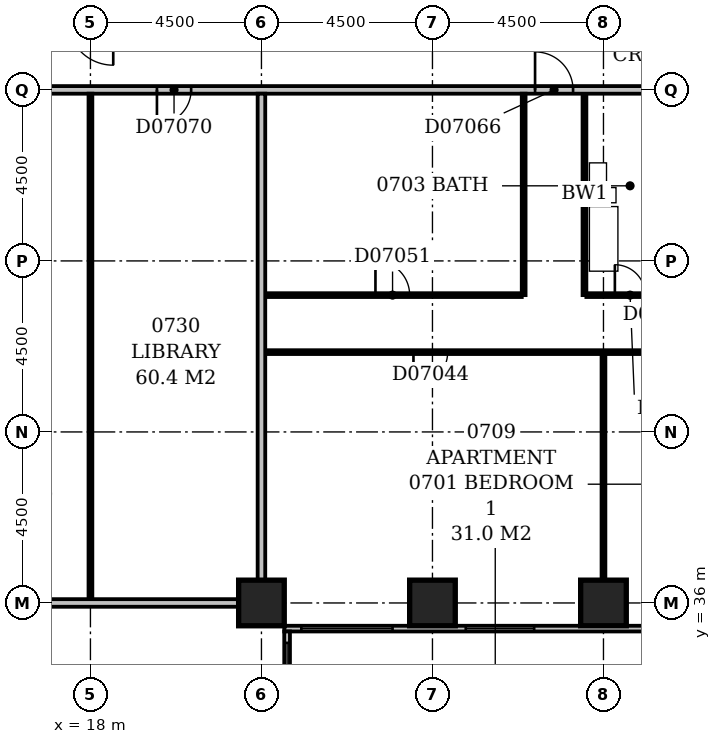
"""IFC4 building model, lengths in metres.
Left out: names, types, materials, properties, quantities, classifications, styles, units other than length and angle.
Written with IfcOpenShell. Run it as: python <this file> out.ifc"""

import sys

from ifc_helpers import new_model, si_unit, direction, frame, frame_2d, origin, origin_2d, place, context, subcontext, project, spatial, rectangle, extrude, element, fill, save


model = new_model("IFC4")
c1 = context("Model", 3, precision=1e-05, world=origin(), true_north=direction((0.0, 1.0)))
c2 = subcontext(c1, "Body", "Model", "MODEL_VIEW")
j1 = project(units=[si_unit("LENGTHUNIT", "METRE"), si_unit("PLANEANGLEUNIT", "RADIAN")], contexts=[c1])
p1 = place(None, origin())
s1 = spatial("IfcSite", under=j1, at=p1, CompositionType="ELEMENT")
p2 = place(p1, origin())
s2 = spatial("IfcBuilding", under=s1, at=p2, CompositionType="ELEMENT")
p3 = place(p2, frame((0.0, 0.0, 36.2)))
s3 = spatial("IfcBuildingStorey", under=s2, at=p3, CompositionType="ELEMENT", Elevation=36.2)
for number, where, z_axis, x_axis in (
    (1, (22.5, 36.0, -0.3), (0.0, 0.0, 1.0), (1.0, 0.0, 0.0)),
    (2, (27.0, 36.0, -0.3), (0.0, 0.0, 1.0), (1.0, 0.0, 0.0)),
    (3, (31.5, 36.0, -0.3), (0.0, 0.0, 1.0), (1.0, 0.0, 0.0)),
):
    element("IfcColumn", number, at=place(p3, frame(where, z_axis=z_axis, x_axis=x_axis)), inside=s3, PredefinedType="COLUMN", context=c2, shape_type="SweptSolid", body=[
        extrude(rectangle(XDim=1.2, YDim=1.2, at=origin_2d()), origin(), (0.0, 0.0, 1.0), 3.6),
    ])
p4 = place(p3, frame((23.175, 17.4, 0.0), z_axis=(0.0, 0.0, 1.0), x_axis=(0.0, 1.0, 0.0)))
e4 = element("IfcWall", 4, at=p4, inside=s3, PredefinedType="STANDARD", context=c2, shape_type="SweptSolid", body=[
    extrude(rectangle(XDim=17.85, YDim=0.15, at=frame_2d((8.925, 0.0))), origin(), (0.0, 0.0, 1.0), 2.7),
])
p5 = place(p4, frame((1.65, 0.0, 0.6)))
e5 = element("IfcOpeningElement", 5, at=p5, cuts=e4, PredefinedType="OPENING", context=c2, shape_type="SweptSolid", body=[
    extrude(rectangle(XDim=2.4, YDim=1.8, at=frame_2d((1.2, 0.9))), frame((0.0, 0.087, 0.0), z_axis=(0.0, -1.0, 0.0), x_axis=(1.0, 0.0, 0.0)), (0.0, 0.0, 1.0), 0.174),
])
p6 = place(p4, frame((6.15, 0.0, 0.6)))
e6 = element("IfcOpeningElement", 6, at=p6, cuts=e4, PredefinedType="OPENING", context=c2, shape_type="SweptSolid", body=[
    extrude(rectangle(XDim=2.4, YDim=1.8, at=frame_2d((1.2, 0.9))), frame((0.0, 0.087, 0.0), z_axis=(0.0, -1.0, 0.0), x_axis=(1.0, 0.0, 0.0)), (0.0, 0.0, 1.0), 0.174),
])
p7 = place(p4, frame((11.465, 0.0, 0.6)))
e7 = element("IfcOpeningElement", 7, at=p7, cuts=e4, PredefinedType="OPENING", context=c2, shape_type="SweptSolid", body=[
    extrude(rectangle(XDim=1.8, YDim=1.8, at=frame_2d((0.9, 0.9))), frame((0.0, 0.087, 0.0), z_axis=(0.0, -1.0, 0.0), x_axis=(1.0, 0.0, 0.0)), (0.0, 0.0, 1.0), 0.174),
])
p8 = place(p4, frame((15.15, 0.0, 0.6)))
e8 = element("IfcOpeningElement", 8, at=p8, cuts=e4, PredefinedType="OPENING", context=c2, shape_type="SweptSolid", body=[
    extrude(rectangle(XDim=2.4, YDim=1.8, at=frame_2d((1.2, 0.9))), frame((0.0, 0.087, 0.0), z_axis=(0.0, -1.0, 0.0), x_axis=(1.0, 0.0, 0.0)), (0.0, 0.0, 1.0), 0.174),
])
p9 = place(p3, frame((23.1, 35.325, 0.0), z_axis=(0.0, 0.0, 1.0), x_axis=(1.0, 0.0, 0.0)))
e9 = element("IfcWall", 9, at=p9, inside=s3, PredefinedType="STANDARD", context=c2, shape_type="SweptSolid", body=[
    extrude(rectangle(XDim=45.15, YDim=0.15, at=frame_2d((22.575, 0.0))), origin(), (0.0, 0.0, 1.0), 2.7),
])
p10 = place(p9, frame((0.45, 0.0, 0.6)))
e10 = element("IfcOpeningElement", 10, at=p10, cuts=e9, PredefinedType="OPENING", context=c2, shape_type="SweptSolid", body=[
    extrude(rectangle(XDim=2.4, YDim=1.8, at=frame_2d((1.2, 0.9))), frame((0.0, 0.087, 0.0), z_axis=(0.0, -1.0, 0.0), x_axis=(1.0, 0.0, 0.0)), (0.0, 0.0, 1.0), 0.174),
])
p11 = place(p9, frame((4.776, 0.0, 0.6)))
e11 = element("IfcOpeningElement", 11, at=p11, cuts=e9, PredefinedType="OPENING", context=c2, shape_type="SweptSolid", body=[
    extrude(rectangle(XDim=1.8, YDim=1.8, at=frame_2d((0.9, 0.9))), frame((0.0, 0.087, 0.0), z_axis=(0.0, -1.0, 0.0), x_axis=(1.0, 0.0, 0.0)), (0.0, 0.0, 1.0), 0.174),
])
p12 = place(p9, frame((9.45, 0.0, 0.6)))
e12 = element("IfcOpeningElement", 12, at=p12, cuts=e9, PredefinedType="OPENING", context=c2, shape_type="SweptSolid", body=[
    extrude(rectangle(XDim=2.4, YDim=1.8, at=frame_2d((1.2, 0.9))), frame((0.0, 0.087, 0.0), z_axis=(0.0, -1.0, 0.0), x_axis=(1.0, 0.0, 0.0)), (0.0, 0.0, 1.0), 0.174),
])
p13 = place(p9, frame((13.95, 0.0, 0.6)))
e13 = element("IfcOpeningElement", 13, at=p13, cuts=e9, PredefinedType="OPENING", context=c2, shape_type="SweptSolid", body=[
    extrude(rectangle(XDim=2.4, YDim=1.8, at=frame_2d((1.2, 0.9))), frame((0.0, 0.087, 0.0), z_axis=(0.0, -1.0, 0.0), x_axis=(1.0, 0.0, 0.0)), (0.0, 0.0, 1.0), 0.174),
])
p14 = place(p9, frame((19.777, 0.0, 0.6)))
e14 = element("IfcOpeningElement", 14, at=p14, cuts=e9, PredefinedType="OPENING", context=c2, shape_type="SweptSolid", body=[
    extrude(rectangle(XDim=1.2, YDim=1.8, at=frame_2d((0.6, 0.9))), frame((0.0, 0.087, 0.0), z_axis=(0.0, -1.0, 0.0), x_axis=(1.0, 0.0, 0.0)), (0.0, 0.0, 1.0), 0.174),
])
p15 = place(p9, frame((22.95, 0.0, 0.6)))
e15 = element("IfcOpeningElement", 15, at=p15, cuts=e9, PredefinedType="OPENING", context=c2, shape_type="SweptSolid", body=[
    extrude(rectangle(XDim=2.4, YDim=1.8, at=frame_2d((1.2, 0.9))), frame((0.0, 0.087, 0.0), z_axis=(0.0, -1.0, 0.0), x_axis=(1.0, 0.0, 0.0)), (0.0, 0.0, 1.0), 0.174),
])
p16 = place(p9, frame((27.45, 0.0, 0.6)))
e16 = element("IfcOpeningElement", 16, at=p16, cuts=e9, PredefinedType="OPENING", context=c2, shape_type="SweptSolid", body=[
    extrude(rectangle(XDim=2.4, YDim=1.8, at=frame_2d((1.2, 0.9))), frame((0.0, 0.087, 0.0), z_axis=(0.0, -1.0, 0.0), x_axis=(1.0, 0.0, 0.0)), (0.0, 0.0, 1.0), 0.174),
])
p17 = place(p9, frame((31.95, 0.0, 0.6)))
e17 = element("IfcOpeningElement", 17, at=p17, cuts=e9, PredefinedType="OPENING", context=c2, shape_type="SweptSolid", body=[
    extrude(rectangle(XDim=2.4, YDim=1.8, at=frame_2d((1.2, 0.9))), frame((0.0, 0.087, 0.0), z_axis=(0.0, -1.0, 0.0), x_axis=(1.0, 0.0, 0.0)), (0.0, 0.0, 1.0), 0.174),
])
p18 = place(p9, frame((37.894, 0.0, 0.6)))
e18 = element("IfcOpeningElement", 18, at=p18, cuts=e9, PredefinedType="OPENING", context=c2, shape_type="SweptSolid", body=[
    extrude(rectangle(XDim=1.2, YDim=1.8, at=frame_2d((0.6, 0.9))), frame((0.0, 0.087, 0.0), z_axis=(0.0, -1.0, 0.0), x_axis=(1.0, 0.0, 0.0)), (0.0, 0.0, 1.0), 0.174),
])
p19 = place(p9, frame((40.95, 0.0, 0.6)))
e19 = element("IfcOpeningElement", 19, at=p19, cuts=e9, PredefinedType="OPENING", context=c2, shape_type="SweptSolid", body=[
    extrude(rectangle(XDim=2.4, YDim=1.8, at=frame_2d((1.2, 0.9))), frame((0.0, 0.087, 0.0), z_axis=(0.0, -1.0, 0.0), x_axis=(1.0, 0.0, 0.0)), (0.0, 0.0, 1.0), 0.174),
])
p20 = place(p3, frame((9.1, 36.0, 0.0), z_axis=(0.0, 0.0, 1.0), x_axis=(1.0, 0.0, 0.0)))
e20 = element("IfcWall", 20, at=p20, inside=s3, PredefinedType="PARTITIONING", context=c2, shape_type="SweptSolid", body=[
    extrude(rectangle(XDim=12.8, YDim=0.2, at=frame_2d((6.4, 0.0))), origin(), (0.0, 0.0, 1.0), 2.4),
])
p21 = place(p3, frame((18.0, 36.1, 0.0), z_axis=(0.0, 0.0, 1.0), x_axis=(0.0, 1.0, 0.0)))
e21 = element("IfcWall", 21, at=p21, inside=s3, PredefinedType="PARTITIONING", context=c2, shape_type="SweptSolid", body=[
    extrude(rectangle(XDim=13.3, YDim=0.1, at=frame_2d((6.65, 0.0))), origin(), (0.0, 0.0, 1.0), 3.3),
])
p22 = place(p3, frame((22.5, 36.6, 0.0), z_axis=(0.0, 0.0, 1.0), x_axis=(0.0, 1.0, 0.0)))
e22 = element("IfcWall", 22, at=p22, inside=s3, PredefinedType="PARTITIONING", context=c2, shape_type="SweptSolid", body=[
    extrude(rectangle(XDim=12.8, YDim=0.2, at=frame_2d((6.4, 0.0))), origin(), (0.0, 0.0, 1.0), 3.3),
])
p23 = place(p3, frame((31.5, 36.6, 0.0), z_axis=(0.0, 0.0, 1.0), x_axis=(0.0, 1.0, 0.0)))
e23 = element("IfcWall", 23, at=p23, inside=s3, PredefinedType="PARTITIONING", context=c2, shape_type="SweptSolid", body=[
    extrude(rectangle(XDim=5.95, YDim=0.1, at=frame_2d((2.975, 0.0))), origin(), (0.0, 0.0, 1.0), 3.3),
])
p24 = place(p3, frame((22.6, 42.6, 0.0), z_axis=(0.0, 0.0, 1.0), x_axis=(1.0, 0.0, 0.0)))
e24 = element("IfcWall", 24, at=p24, inside=s3, PredefinedType="PARTITIONING", context=c2, shape_type="SweptSolid", body=[
    extrude(rectangle(XDim=17.8, YDim=0.1, at=frame_2d((8.9, 0.0))), origin(), (0.0, 0.0, 1.0), 3.3),
])
p25 = place(p24, frame((3.9, 0.0, 0.0)))
e25 = element("IfcOpeningElement", 25, at=p25, cuts=e24, PredefinedType="OPENING", context=c2, shape_type="SweptSolid", body=[
    extrude(rectangle(XDim=0.9, YDim=2.1, at=frame_2d((0.45, 1.05))), frame((0.0, 0.062, 0.0), z_axis=(0.0, -1.0, 0.0), x_axis=(1.0, 0.0, 0.0)), (0.0, 0.0, 1.0), 0.124),
])
p26 = place(p24, frame((10.7, 0.0, 0.0)))
e26 = element("IfcOpeningElement", 26, at=p26, cuts=e24, PredefinedType="OPENING", context=c2, shape_type="SweptSolid", body=[
    extrude(rectangle(XDim=0.9, YDim=2.1, at=frame_2d((0.45, 1.05))), frame((0.0, 0.062, 0.0), z_axis=(0.0, -1.0, 0.0), x_axis=(1.0, 0.0, 0.0)), (0.0, 0.0, 1.0), 0.124),
])
p27 = place(p24, frame((14.05, 0.0, 0.0)))
e27 = element("IfcOpeningElement", 27, at=p27, cuts=e24, PredefinedType="OPENING", context=c2, shape_type="SweptSolid", body=[
    extrude(rectangle(XDim=0.9, YDim=2.1, at=frame_2d((0.45, 1.05))), frame((0.0, 0.062, 0.0), z_axis=(0.0, -1.0, 0.0), x_axis=(1.0, 0.0, 0.0)), (0.0, 0.0, 1.0), 0.124),
])
p28 = place(p3, frame((22.6, 44.1, 0.0), z_axis=(0.0, 0.0, 1.0), x_axis=(1.0, 0.0, 0.0)))
e28 = element("IfcWall", 28, at=p28, inside=s3, PredefinedType="PARTITIONING", context=c2, shape_type="SweptSolid", body=[
    extrude(rectangle(XDim=6.75, YDim=0.1, at=frame_2d((3.375, 0.0))), origin(), (0.0, 0.0, 1.0), 3.3),
])
p29 = place(p28, frame((2.9, 0.0, 0.0)))
e29 = element("IfcOpeningElement", 29, at=p29, cuts=e28, PredefinedType="OPENING", context=c2, shape_type="SweptSolid", body=[
    extrude(rectangle(XDim=0.9, YDim=2.1, at=frame_2d((0.45, 1.05))), frame((0.0, 0.062, 0.0), z_axis=(0.0, -1.0, 0.0), x_axis=(1.0, 0.0, 0.0)), (0.0, 0.0, 1.0), 0.124),
])
p30 = place(p3, frame((29.4, 44.1, 0.0), z_axis=(0.0, 0.0, 1.0), x_axis=(0.0, 1.0, 0.0)))
e30 = element("IfcWall", 30, at=p30, inside=s3, PredefinedType="PARTITIONING", context=c2, shape_type="SweptSolid", body=[
    extrude(rectangle(XDim=5.3, YDim=0.1, at=frame_2d((2.65, 0.0))), origin(), (0.0, 0.0, 1.0), 3.3),
])
p31 = place(p3, frame((31.0, 44.1, 0.0), z_axis=(0.0, 0.0, 1.0), x_axis=(0.0, 1.0, 0.0)))
e31 = element("IfcWall", 31, at=p31, inside=s3, PredefinedType="PLUMBINGWALL", context=c2, shape_type="SweptSolid", body=[
    extrude(rectangle(XDim=5.3, YDim=0.1, at=frame_2d((2.65, 0.0))), origin(), (0.0, 0.0, 1.0), 3.3),
])
p32 = place(p3, frame((31.05, 44.1, 0.0), z_axis=(0.0, 0.0, 1.0), x_axis=(1.0, 0.0, 0.0)))
e32 = element("IfcWall", 32, at=p32, inside=s3, PredefinedType="PARTITIONING", context=c2, shape_type="SweptSolid", body=[
    extrude(rectangle(XDim=9.35, YDim=0.1, at=frame_2d((4.675, 0.0))), origin(), (0.0, 0.0, 1.0), 3.3),
])
p33 = place(p32, frame((0.75, 0.0, 0.0)))
e33 = element("IfcOpeningElement", 33, at=p33, cuts=e32, PredefinedType="OPENING", context=c2, shape_type="SweptSolid", body=[
    extrude(rectangle(XDim=0.8, YDim=2.1, at=frame_2d((0.4, 1.05))), frame((0.0, 0.062, 0.0), z_axis=(0.0, -1.0, 0.0), x_axis=(1.0, 0.0, 0.0)), (0.0, 0.0, 1.0), 0.124),
])
p34 = place(p32, frame((8.05, 0.0, 0.0)))
e34 = element("IfcOpeningElement", 34, at=p34, cuts=e32, PredefinedType="OPENING", context=c2, shape_type="SweptSolid", body=[
    extrude(rectangle(XDim=0.8, YDim=2.1, at=frame_2d((0.4, 1.05))), frame((0.0, 0.062, 0.0), z_axis=(0.0, -1.0, 0.0), x_axis=(1.0, 0.0, 0.0)), (0.0, 0.0, 1.0), 0.124),
])
p35 = place(p32, frame((4.25, 0.0, 0.0)))
e35 = element("IfcOpeningElement", 35, at=p35, cuts=e32, PredefinedType="OPENING", context=c2, shape_type="SweptSolid", body=[
    extrude(rectangle(XDim=0.8, YDim=2.1, at=frame_2d((0.4, 1.05))), frame((0.0, 0.062, 0.0), z_axis=(0.0, -1.0, 0.0), x_axis=(1.0, 0.0, 0.0)), (0.0, 0.0, 1.0), 0.124),
])
p36 = place(p32, frame((6.05, 0.0, 0.0)))
e36 = element("IfcOpeningElement", 36, at=p36, cuts=e32, PredefinedType="OPENING", context=c2, shape_type="SweptSolid", body=[
    extrude(rectangle(XDim=0.8, YDim=2.1, at=frame_2d((0.4, 1.05))), frame((0.0, 0.062, 0.0), z_axis=(0.0, -1.0, 0.0), x_axis=(1.0, 0.0, 0.0)), (0.0, 0.0, 1.0), 0.124),
])
p37 = place(p32, frame((2.7, 0.0, 0.0)))
e37 = element("IfcOpeningElement", 37, at=p37, cuts=e32, PredefinedType="OPENING", context=c2, shape_type="SweptSolid", body=[
    extrude(rectangle(XDim=0.8, YDim=2.1, at=frame_2d((0.4, 1.05))), frame((0.0, 0.062, 0.0), z_axis=(0.0, -1.0, 0.0), x_axis=(1.0, 0.0, 0.0)), (0.0, 0.0, 1.0), 0.124),
])
p38 = place(p3, frame((9.1, 49.5, 0.0), z_axis=(0.0, 0.0, 1.0), x_axis=(1.0, 0.0, 0.0)))
e38 = element("IfcWall", 38, at=p38, inside=s3, PredefinedType="PARTITIONING", context=c2, shape_type="SweptSolid", body=[
    extrude(rectangle(XDim=57.8, YDim=0.2, at=frame_2d((28.9, 0.0))), origin(), (0.0, 0.0, 1.0), 3.3),
])
p39 = place(p38, frame((20.6, 0.0, 0.0)))
e39 = element("IfcOpeningElement", 39, at=p39, cuts=e38, PredefinedType="OPENING", context=c2, shape_type="SweptSolid", body=[
    extrude(rectangle(XDim=1.0, YDim=2.1, at=frame_2d((0.5, 1.05))), frame((0.0, 0.112, 0.0), z_axis=(0.0, -1.0, 0.0), x_axis=(1.0, 0.0, 0.0)), (0.0, 0.0, 1.0), 0.224),
])
p40 = place(p38, frame((31.7, 0.0, 0.0)))
e40 = element("IfcOpeningElement", 40, at=p40, cuts=e38, PredefinedType="OPENING", context=c2, shape_type="SweptSolid", body=[
    extrude(rectangle(XDim=1.0, YDim=2.1, at=frame_2d((0.5, 1.05))), frame((0.0, 0.112, 0.0), z_axis=(0.0, -1.0, 0.0), x_axis=(1.0, 0.0, 0.0)), (0.0, 0.0, 1.0), 0.224),
])
p41 = place(p38, frame((47.6, 0.0, 0.0)))
e41 = element("IfcOpeningElement", 41, at=p41, cuts=e38, PredefinedType="OPENING", context=c2, shape_type="SweptSolid", body=[
    extrude(rectangle(XDim=1.0, YDim=2.1, at=frame_2d((0.5, 1.05))), frame((0.0, 0.112, 0.0), z_axis=(0.0, -1.0, 0.0), x_axis=(1.0, 0.0, 0.0)), (0.0, 0.0, 1.0), 0.224),
])
p42 = place(p38, frame((54.15, 0.0, 0.0)))
e42 = element("IfcOpeningElement", 42, at=p42, cuts=e38, PredefinedType="OPENING", context=c2, shape_type="SweptSolid", body=[
    extrude(rectangle(XDim=1.0, YDim=2.1, at=frame_2d((0.5, 1.05))), frame((0.0, 0.112, 0.0), z_axis=(0.0, -1.0, 0.0), x_axis=(1.0, 0.0, 0.0)), (0.0, 0.0, 1.0), 0.224),
])
p43 = place(p38, frame((10.65, 0.0, 0.0)))
e43 = element("IfcOpeningElement", 43, at=p43, cuts=e38, PredefinedType="OPENING", context=c2, shape_type="SweptSolid", body=[
    extrude(rectangle(XDim=0.9, YDim=2.1, at=frame_2d((0.45, 1.05))), frame((0.0, 0.112, 0.0), z_axis=(0.0, -1.0, 0.0), x_axis=(1.0, 0.0, 0.0)), (0.0, 0.0, 1.0), 0.224),
])
p44 = place(p8, origin())
e44 = element("IfcWindow", 44, at=p44, inside=s3, PartitioningType="SINGLE_PANEL", PredefinedType="WINDOW", context=c2, shape_type="SweptSolid", body=[
    extrude(rectangle(XDim=2.4, YDim=1.8, at=frame_2d((1.2, 0.9))), frame((0.0, 0.03, 0.0), z_axis=(0.0, -1.0, 0.0), x_axis=(1.0, 0.0, 0.0)), (0.0, 0.0, 1.0), 0.06),
])
fill(e8, e44)
p45 = place(p10, origin())
e45 = element("IfcWindow", 45, at=p45, inside=s3, PartitioningType="SINGLE_PANEL", PredefinedType="WINDOW", context=c2, shape_type="SweptSolid", body=[
    extrude(rectangle(XDim=2.4, YDim=1.8, at=frame_2d((1.2, 0.9))), frame((0.0, 0.03, 0.0), z_axis=(0.0, -1.0, 0.0), x_axis=(1.0, 0.0, 0.0)), (0.0, 0.0, 1.0), 0.06),
])
fill(e10, e45)
p46 = place(p11, origin())
e46 = element("IfcWindow", 46, at=p46, inside=s3, PartitioningType="SINGLE_PANEL", PredefinedType="WINDOW", context=c2, shape_type="SweptSolid", body=[
    extrude(rectangle(XDim=1.8, YDim=1.8, at=frame_2d((0.9, 0.9))), frame((0.0, 0.03, 0.0), z_axis=(0.0, -1.0, 0.0), x_axis=(1.0, 0.0, 0.0)), (0.0, 0.0, 1.0), 0.06),
])
fill(e11, e46)
p47 = place(p25, frame((0.9, 0.0, 0.0), z_axis=(0.0, 0.0, 1.0), x_axis=(-1.0, 0.0, 0.0)))
e47 = element("IfcDoor", 47, at=p47, inside=s3, OperationType="SINGLE_SWING_RIGHT", PredefinedType="DOOR", context=c2, shape_type="SweptSolid", body=[
    extrude(rectangle(XDim=0.9, YDim=2.1, at=frame_2d((0.45, 1.05))), frame((0.0, 0.025, 0.0), z_axis=(0.0, -1.0, 0.0), x_axis=(1.0, 0.0, 0.0)), (0.0, 0.0, 1.0), 0.05),
])
fill(e25, e47)
p48 = place(p29, origin())
e48 = element("IfcDoor", 48, at=p48, inside=s3, OperationType="SINGLE_SWING_LEFT", PredefinedType="DOOR", context=c2, shape_type="SweptSolid", body=[
    extrude(rectangle(XDim=0.9, YDim=2.1, at=frame_2d((0.45, 1.05))), frame((0.0, 0.025, 0.0), z_axis=(0.0, -1.0, 0.0), x_axis=(1.0, 0.0, 0.0)), (0.0, 0.0, 1.0), 0.05),
])
fill(e29, e48)
p49 = place(p33, origin())
e49 = element("IfcDoor", 49, at=p49, inside=s3, OperationType="SINGLE_SWING_LEFT", PredefinedType="DOOR", context=c2, shape_type="SweptSolid", body=[
    extrude(rectangle(XDim=0.8, YDim=2.1, at=frame_2d((0.4, 1.05))), frame((0.0, 0.025, 0.0), z_axis=(0.0, -1.0, 0.0), x_axis=(1.0, 0.0, 0.0)), (0.0, 0.0, 1.0), 0.05),
])
fill(e33, e49)
p50 = place(p39, origin())
e50 = element("IfcDoor", 50, at=p50, inside=s3, OperationType="SINGLE_SWING_LEFT", PredefinedType="DOOR", context=c2, shape_type="SweptSolid", body=[
    extrude(rectangle(XDim=1.0, YDim=2.1, at=frame_2d((0.5, 1.05))), frame((0.0, 0.025, 0.0), z_axis=(0.0, -1.0, 0.0), x_axis=(1.0, 0.0, 0.0)), (0.0, 0.0, 1.0), 0.05),
])
fill(e39, e50)
p51 = place(p43, frame((0.9, 0.0, 0.0), z_axis=(0.0, 0.0, 1.0), x_axis=(-1.0, 0.0, 0.0)))
e51 = element("IfcDoor", 51, at=p51, inside=s3, OperationType="SINGLE_SWING_RIGHT", PredefinedType="DOOR", context=c2, shape_type="SweptSolid", body=[
    extrude(rectangle(XDim=0.9, YDim=2.1, at=frame_2d((0.45, 1.05))), frame((0.0, 0.025, 0.0), z_axis=(0.0, -1.0, 0.0), x_axis=(1.0, 0.0, 0.0)), (0.0, 0.0, 1.0), 0.05),
])
fill(e43, e51)
save(model, sys.argv[1])
